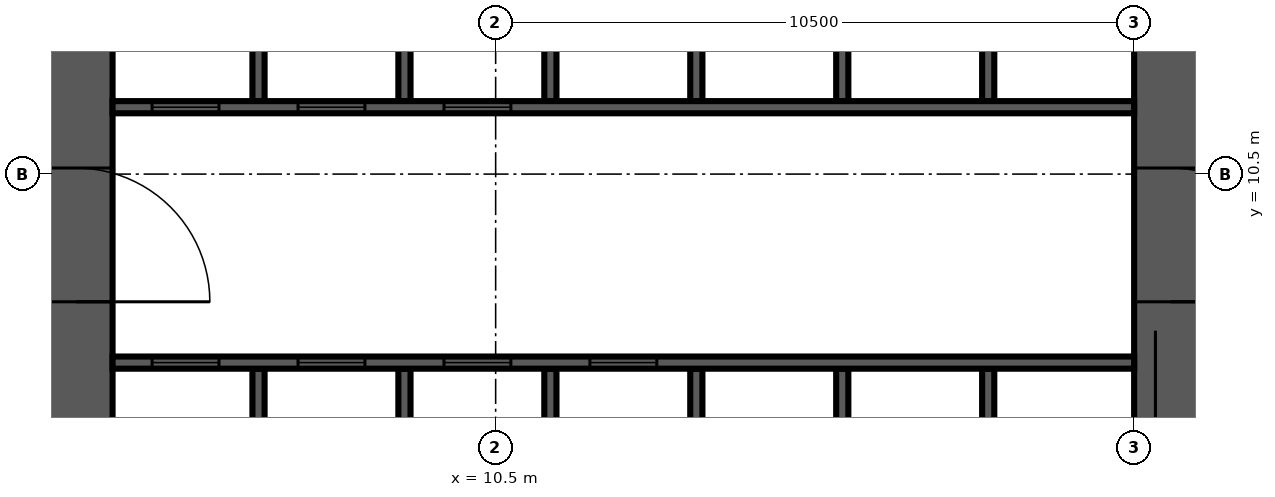
"""IFC4 building model, lengths in metres.
Left out: names, types, materials, properties, quantities, classifications, styles, units other than length and angle.
Written with IfcOpenShell. Run it as: python <this file> out.ifc"""

import sys

from ifc_helpers import new_model, si_unit, direction, frame, frame_2d, origin, place, context, subcontext, project, spatial, rectangle, extrude, source, transform, mapped, element, fill, save


model = new_model("IFC4")
c1 = context("Model", 3, precision=1e-05, world=origin(), true_north=direction((0.0, 1.0)))
c2 = subcontext(c1, "Body", "Model", "MODEL_VIEW")
j1 = project(units=[si_unit("LENGTHUNIT", "METRE"), si_unit("PLANEANGLEUNIT", "RADIAN")], contexts=[c1])
p1 = place(None, origin())
s1 = spatial("IfcSite", under=j1, at=p1, CompositionType="ELEMENT")
p2 = place(p1, origin())
s2 = spatial("IfcBuilding", under=s1, at=p2, CompositionType="ELEMENT")
p3 = place(p2, frame((0.0, 0.0, 95.1)))
s3 = spatial("IfcBuildingStorey", under=s2, at=p3, CompositionType="ELEMENT", Elevation=95.1)
m1 = source(origin(), c2, "Body", "SweptSolid", [
    extrude(rectangle(XDim=18.0, YDim=1.2, at=frame_2d((9.0, 0.0))), origin(), (0.0, 0.0, 1.0), 4.2),
])
p4 = place(p3, frame((3.6, 4.2, 0.0), z_axis=(0.0, 0.0, 1.0), x_axis=(0.0, 1.0, 0.0)))
e1 = element("IfcWall", 1, at=p4, inside=s3, PredefinedType="SHEAR", context=c2, shape_type="MappedRepresentation", body=[
    mapped(m1, transform((0.0, 0.0, 0.0), scale=1.0)),
])
m2 = source(origin(), c2, "Body", "SweptSolid", [
    extrude(rectangle(XDim=2.2, YDim=2.1, at=frame_2d((1.1, 1.05))), frame((0.0, 0.61, 0.0), z_axis=(0.0, -1.0, 0.0), x_axis=(1.0, 0.0, 0.0)), (0.0, 0.0, 1.0), 1.22),
])
p5 = place(p4, frame((4.2, 0.0, 0.0)))
e2 = element("IfcOpeningElement", 2, at=p5, cuts=e1, PredefinedType="OPENING", context=c2, shape_type="MappedRepresentation", body=[
    mapped(m2, transform((0.0, 0.0, 0.0), scale=1.0)),
])
m3 = source(origin(), c2, "Body", "SweptSolid", [
    extrude(rectangle(XDim=16.8, YDim=1.2, at=frame_2d((8.4, 0.0))), origin(), (0.0, 0.0, 1.0), 4.2),
])
p6 = place(p3, frame((21.6, 4.2, 0.0), z_axis=(0.0, 0.0, 1.0), x_axis=(0.0, 1.0, 0.0)))
e3 = element("IfcWall", 3, at=p6, inside=s3, PredefinedType="SHEAR", context=c2, shape_type="MappedRepresentation", body=[
    mapped(m3, transform((0.0, 0.0, 0.0), scale=1.0)),
])
p7 = place(p6, frame((4.2, 0.0, 0.0)))
e4 = element("IfcOpeningElement", 4, at=p7, cuts=e3, PredefinedType="OPENING", context=c2, shape_type="MappedRepresentation", body=[
    mapped(m2, transform((0.0, 0.0, 0.0), scale=1.0)),
])
m4 = source(origin(), c2, "Body", "SweptSolid", [
    extrude(rectangle(XDim=1.2, YDim=2.1, at=frame_2d((0.6, 1.05))), frame((0.0, 0.61, 0.0), z_axis=(0.0, -1.0, 0.0), x_axis=(1.0, 0.0, 0.0)), (0.0, 0.0, 1.0), 1.22),
])
p8 = place(p6, frame((14.7, 0.0, 0.0)))
e5 = element("IfcOpeningElement", 5, at=p8, cuts=e3, PredefinedType="OPENING", context=c2, shape_type="MappedRepresentation", body=[
    mapped(m4, transform((0.0, 0.0, 0.0), scale=1.0)),
])
m5 = source(origin(), c2, "Body", "SweptSolid", [
    extrude(rectangle(XDim=3.1, YDim=0.2, at=frame_2d((1.55, 0.0))), origin(), (0.0, 0.0, 1.0), 4.2),
])
for number, where, z_axis, x_axis in (
    (6, (6.6, 4.2, 0.0), (0.0, 0.0, 1.0), (0.0, 1.0, 0.0)),
    (7, (9.0, 4.2, 0.0), (0.0, 0.0, 1.0), (0.0, 1.0, 0.0)),
    (8, (11.4, 4.2, 0.0), (0.0, 0.0, 1.0), (0.0, 1.0, 0.0)),
    (9, (13.8, 4.2, 0.0), (0.0, 0.0, 1.0), (0.0, 1.0, 0.0)),
    (10, (16.2, 4.2, 0.0), (0.0, 0.0, 1.0), (0.0, 1.0, 0.0)),
    (11, (18.6, 4.2, 0.0), (0.0, 0.0, 1.0), (0.0, 1.0, 0.0)),
):
    element("IfcWall", number, at=place(p3, frame(where, z_axis=z_axis, x_axis=x_axis)), inside=s3, PredefinedType="SOLIDWALL", context=c2, shape_type="MappedRepresentation", body=[
        mapped(m5, transform((0.0, 0.0, 0.0), scale=1.0)),
    ])
m6 = source(origin(), c2, "Body", "SweptSolid", [
    extrude(rectangle(XDim=3.0, YDim=0.2, at=frame_2d((1.5, 0.0))), origin(), (0.0, 0.0, 1.0), 4.2),
])
for number, where, z_axis, x_axis in (
    (12, (6.6, 11.7, 0.0), (0.0, 0.0, 1.0), (0.0, 1.0, 0.0)),
    (13, (9.0, 11.7, 0.0), (0.0, 0.0, 1.0), (0.0, 1.0, 0.0)),
    (14, (11.4, 11.7, 0.0), (0.0, 0.0, 1.0), (0.0, 1.0, 0.0)),
    (15, (13.8, 11.7, 0.0), (0.0, 0.0, 1.0), (0.0, 1.0, 0.0)),
    (16, (16.2, 11.7, 0.0), (0.0, 0.0, 1.0), (0.0, 1.0, 0.0)),
    (17, (18.6, 11.7, 0.0), (0.0, 0.0, 1.0), (0.0, 1.0, 0.0)),
):
    element("IfcWall", number, at=place(p3, frame(where, z_axis=z_axis, x_axis=x_axis)), inside=s3, PredefinedType="SOLIDWALL", context=c2, shape_type="MappedRepresentation", body=[
        mapped(m6, transform((0.0, 0.0, 0.0), scale=1.0)),
    ])
m7 = source(origin(), c2, "Body", "SweptSolid", [
    extrude(rectangle(XDim=16.8, YDim=0.2, at=frame_2d((8.4, 0.0))), origin(), (0.0, 0.0, 1.0), 4.2),
])
p9 = place(p3, frame((4.2, 7.4, 0.0), z_axis=(0.0, 0.0, 1.0), x_axis=(1.0, 0.0, 0.0)))
e18 = element("IfcWall", 18, at=p9, inside=s3, PredefinedType="SOLIDWALL", context=c2, shape_type="MappedRepresentation", body=[
    mapped(m7, transform((0.0, 0.0, 0.0), scale=1.0)),
])
m8 = source(origin(), c2, "Body", "SweptSolid", [
    extrude(rectangle(XDim=1.1, YDim=2.1, at=frame_2d((0.55, 1.05))), frame((0.0, 0.11, 0.0), z_axis=(0.0, -1.0, 0.0), x_axis=(1.0, 0.0, 0.0)), (0.0, 0.0, 1.0), 0.22),
])
p10 = place(p9, frame((0.65, 0.0, 0.0)))
e19 = element("IfcOpeningElement", 19, at=p10, cuts=e18, PredefinedType="OPENING", context=c2, shape_type="MappedRepresentation", body=[
    mapped(m8, transform((0.0, 0.0, 0.0), scale=1.0)),
])
p11 = place(p9, frame((3.05, 0.0, 0.0)))
e20 = element("IfcOpeningElement", 20, at=p11, cuts=e18, PredefinedType="OPENING", context=c2, shape_type="MappedRepresentation", body=[
    mapped(m8, transform((0.0, 0.0, 0.0), scale=1.0)),
])
p12 = place(p9, frame((5.45, 0.0, 0.0)))
e21 = element("IfcOpeningElement", 21, at=p12, cuts=e18, PredefinedType="OPENING", context=c2, shape_type="MappedRepresentation", body=[
    mapped(m8, transform((0.0, 0.0, 0.0), scale=1.0)),
])
p13 = place(p9, frame((7.85, 0.0, 0.0)))
e22 = element("IfcOpeningElement", 22, at=p13, cuts=e18, PredefinedType="OPENING", context=c2, shape_type="MappedRepresentation", body=[
    mapped(m8, transform((0.0, 0.0, 0.0), scale=1.0)),
])
p14 = place(p3, frame((4.2, 11.6, 0.0), z_axis=(0.0, 0.0, 1.0), x_axis=(1.0, 0.0, 0.0)))
e23 = element("IfcWall", 23, at=p14, inside=s3, PredefinedType="SOLIDWALL", context=c2, shape_type="MappedRepresentation", body=[
    mapped(m7, transform((0.0, 0.0, 0.0), scale=1.0)),
])
p15 = place(p14, frame((0.65, 0.0, 0.0)))
e24 = element("IfcOpeningElement", 24, at=p15, cuts=e23, PredefinedType="OPENING", context=c2, shape_type="MappedRepresentation", body=[
    mapped(m8, transform((0.0, 0.0, 0.0), scale=1.0)),
])
p16 = place(p14, frame((3.05, 0.0, 0.0)))
e25 = element("IfcOpeningElement", 25, at=p16, cuts=e23, PredefinedType="OPENING", context=c2, shape_type="MappedRepresentation", body=[
    mapped(m8, transform((0.0, 0.0, 0.0), scale=1.0)),
])
p17 = place(p14, frame((5.45, 0.0, 0.0)))
e26 = element("IfcOpeningElement", 26, at=p17, cuts=e23, PredefinedType="OPENING", context=c2, shape_type="MappedRepresentation", body=[
    mapped(m8, transform((0.0, 0.0, 0.0), scale=1.0)),
])
m9 = source(origin(), c2, "Body", "SweptSolid", [
    extrude(rectangle(XDim=1.1, YDim=2.1, at=frame_2d((0.55, 1.05))), frame((0.0, 0.025, 0.0), z_axis=(0.0, -1.0, 0.0), x_axis=(1.0, 0.0, 0.0)), (0.0, 0.0, 1.0), 0.05),
])
p18 = place(p10, origin())
e27 = element("IfcDoor", 27, at=p18, inside=s3, OperationType="SLIDING_TO_LEFT", PredefinedType="DOOR", context=c2, shape_type="MappedRepresentation", body=[
    mapped(m9, transform((0.0, 0.0, 0.0), scale=1.0)),
])
fill(e19, e27)
p19 = place(p11, origin())
e28 = element("IfcDoor", 28, at=p19, inside=s3, OperationType="SLIDING_TO_LEFT", PredefinedType="DOOR", context=c2, shape_type="MappedRepresentation", body=[
    mapped(m9, transform((0.0, 0.0, 0.0), scale=1.0)),
])
fill(e20, e28)
p20 = place(p12, origin())
e29 = element("IfcDoor", 29, at=p20, inside=s3, OperationType="SLIDING_TO_LEFT", PredefinedType="DOOR", context=c2, shape_type="MappedRepresentation", body=[
    mapped(m9, transform((0.0, 0.0, 0.0), scale=1.0)),
])
fill(e21, e29)
p21 = place(p13, origin())
e30 = element("IfcDoor", 30, at=p21, inside=s3, OperationType="SLIDING_TO_LEFT", PredefinedType="DOOR", context=c2, shape_type="MappedRepresentation", body=[
    mapped(m9, transform((0.0, 0.0, 0.0), scale=1.0)),
])
fill(e22, e30)
p22 = place(p15, origin())
e31 = element("IfcDoor", 31, at=p22, inside=s3, OperationType="SLIDING_TO_LEFT", PredefinedType="DOOR", context=c2, shape_type="MappedRepresentation", body=[
    mapped(m9, transform((0.0, 0.0, 0.0), scale=1.0)),
])
fill(e24, e31)
p23 = place(p16, origin())
e32 = element("IfcDoor", 32, at=p23, inside=s3, OperationType="SLIDING_TO_LEFT", PredefinedType="DOOR", context=c2, shape_type="MappedRepresentation", body=[
    mapped(m9, transform((0.0, 0.0, 0.0), scale=1.0)),
])
fill(e25, e32)
p24 = place(p17, origin())
e33 = element("IfcDoor", 33, at=p24, inside=s3, OperationType="SLIDING_TO_LEFT", PredefinedType="DOOR", context=c2, shape_type="MappedRepresentation", body=[
    mapped(m9, transform((0.0, 0.0, 0.0), scale=1.0)),
])
fill(e26, e33)
m10 = source(origin(), c2, "Body", "SweptSolid", [
    extrude(rectangle(XDim=2.2, YDim=2.1, at=frame_2d((1.1, 1.05))), frame((0.0, 0.025, 0.0), z_axis=(0.0, -1.0, 0.0), x_axis=(1.0, 0.0, 0.0)), (0.0, 0.0, 1.0), 0.05),
])
p25 = place(p7, origin())
e34 = element("IfcDoor", 34, at=p25, inside=s3, OperationType="DOUBLE_DOOR_SINGLE_SWING", PredefinedType="DOOR", context=c2, shape_type="MappedRepresentation", body=[
    mapped(m10, transform((0.0, 0.0, 0.0), scale=1.0)),
])
fill(e4, e34)
p26 = place(p5, origin())
e35 = element("IfcDoor", 35, at=p26, inside=s3, OperationType="DOUBLE_DOOR_SINGLE_SWING", PredefinedType="DOOR", context=c2, shape_type="MappedRepresentation", body=[
    mapped(m10, transform((0.0, 0.0, 0.0), scale=1.0)),
])
fill(e2, e35)
save(model, sys.argv[1])
